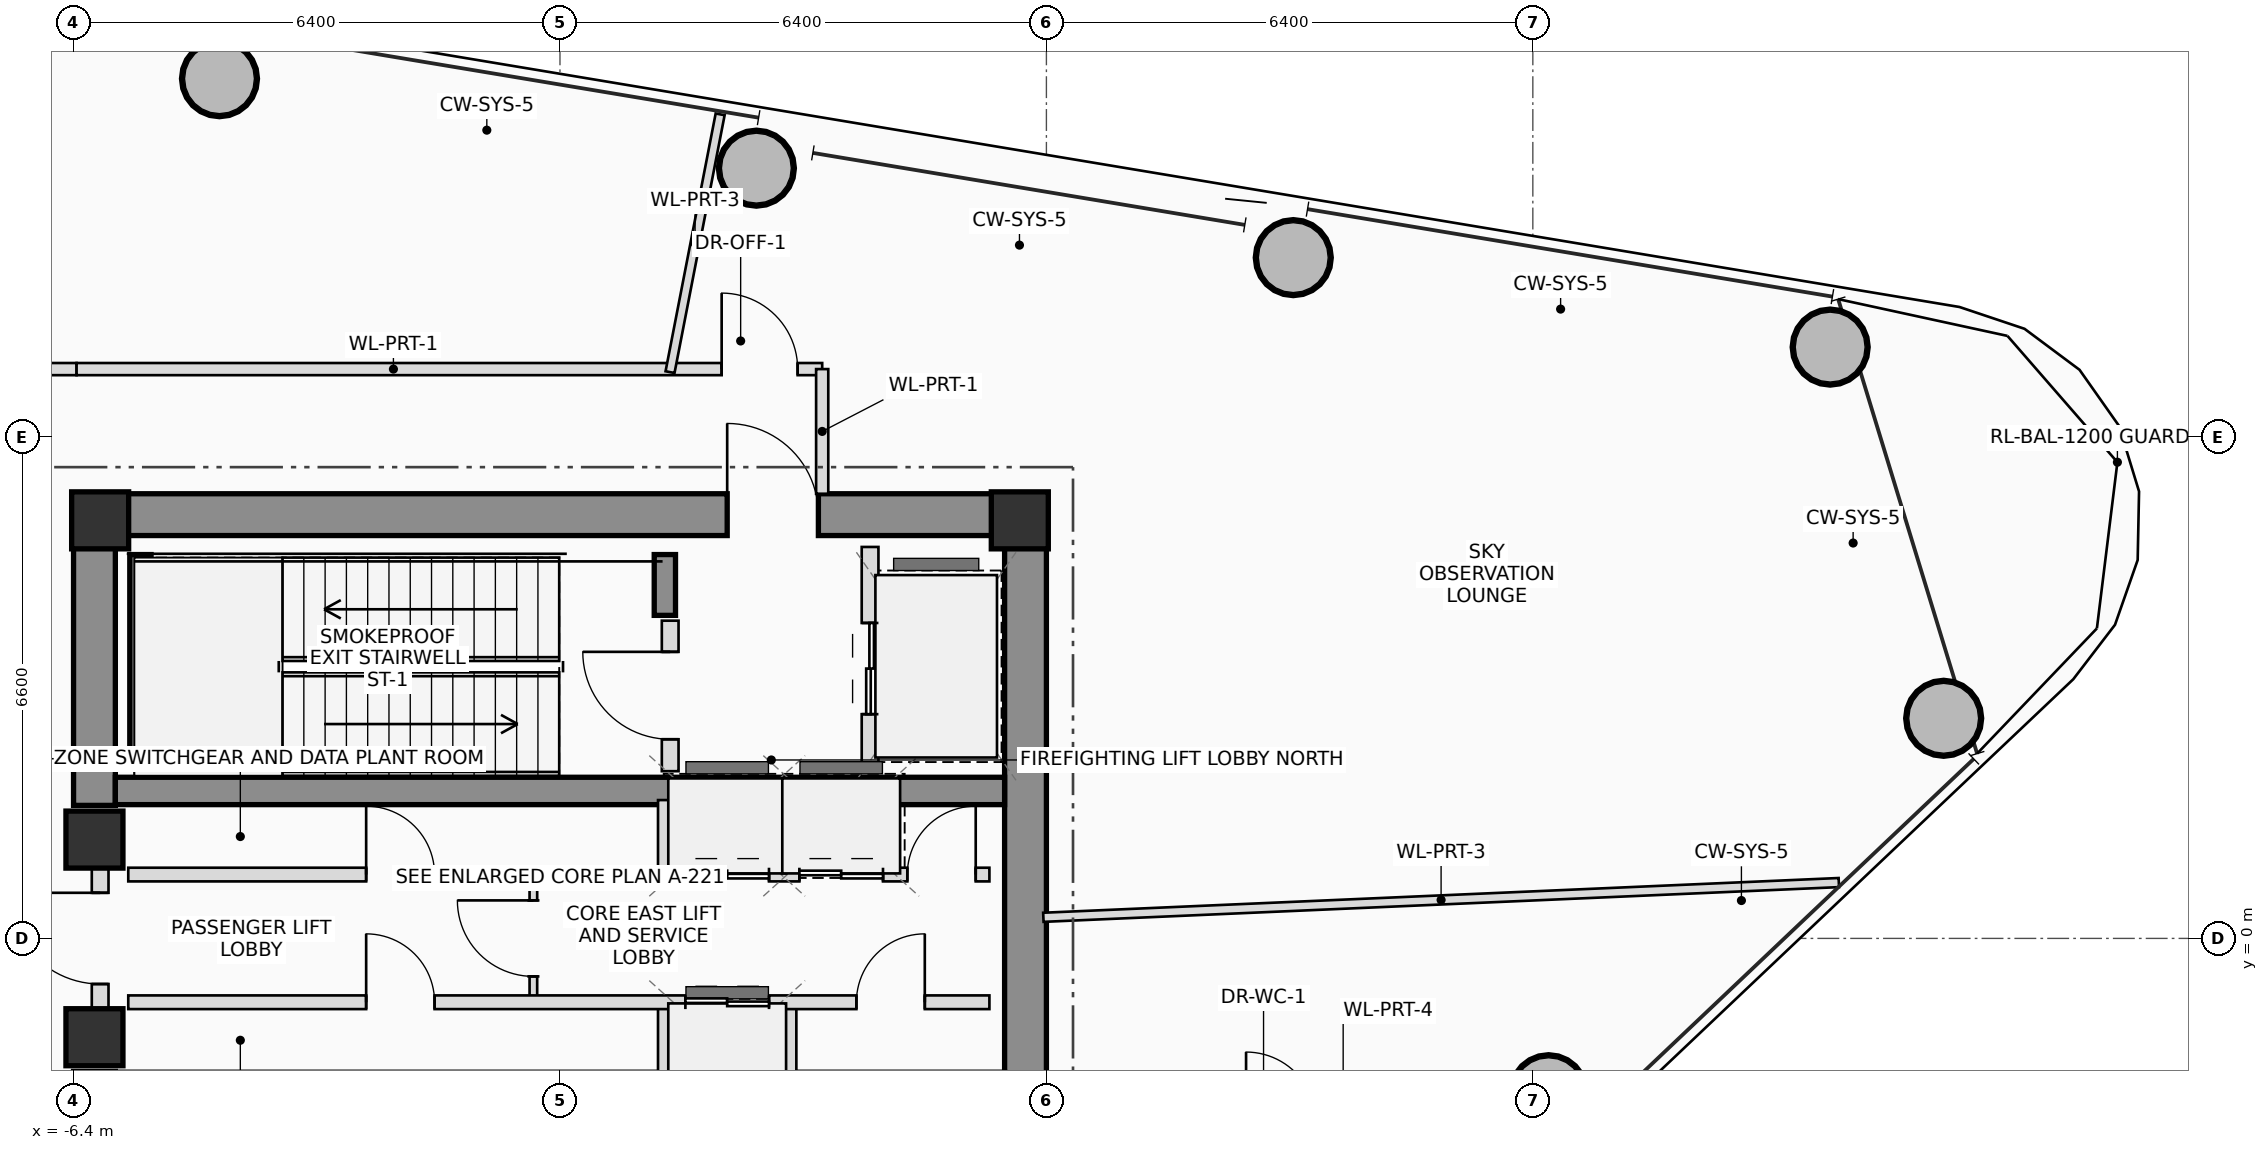
"""IFC4 building model, lengths in metres.
Left out: names, types, materials, properties, quantities, classifications, styles, units other than length and angle.
Written with IfcOpenShell. Run it as: python <this file> out.ifc"""

import sys

from ifc_helpers import new_model, si_unit, direction, frame, frame_2d, origin, origin_2d, place, context, subcontext, project, spatial, rectangle, hollow_circle, extrude, source, transform, mapped, element, fill, save


model = new_model("IFC4")
c1 = context("Model", 3, precision=1e-05, world=origin(), true_north=direction((0.0, 1.0)))
c2 = subcontext(c1, "Body", "Model", "MODEL_VIEW")
j1 = project(units=[si_unit("LENGTHUNIT", "METRE"), si_unit("PLANEANGLEUNIT", "RADIAN")], contexts=[c1])
p1 = place(None, origin())
s1 = spatial("IfcSite", under=j1, at=p1, CompositionType="ELEMENT")
p2 = place(p1, origin())
s2 = spatial("IfcBuilding", under=s1, at=p2, CompositionType="ELEMENT")
p3 = place(p2, frame((0.0, 0.0, 224.15)))
s3 = spatial("IfcBuildingStorey", under=s2, at=p3, CompositionType="ELEMENT", Elevation=224.15)
m1 = source(origin(), c2, "Body", "SweptSolid", [
    extrude(rectangle(XDim=0.75, YDim=0.75, at=origin_2d()), origin(), (0.0, 0.0, 1.0), 4.5),
])
for number, where, z_axis, x_axis in (
    (1, (6.05, 5.5, 0.0), (0.0, 0.0, 1.0), (1.0, 0.0, 0.0)),
    (2, (-6.05, 5.5, 0.0), (0.0, 0.0, 1.0), (1.0, 0.0, 0.0)),
):
    element("IfcColumn", number, at=place(p3, frame(where, z_axis=z_axis, x_axis=x_axis)), inside=s3, PredefinedType="COLUMN", context=c2, shape_type="MappedRepresentation", body=[
        mapped(m1, transform((0.0, 0.0, 0.0), scale=1.0)),
    ])
p4 = place(p3, frame((-6.4, 5.575, 0.0), z_axis=(0.0, 0.0, 1.0), x_axis=(1.0, 0.0, 0.0)))
e3 = element("IfcWall", 3, at=p4, inside=s3, PredefinedType="SHEAR", context=c2, shape_type="SweptSolid", body=[
    extrude(rectangle(XDim=12.8, YDim=0.55, at=frame_2d((6.4, 0.0))), origin(), (0.0, 0.0, 1.0), 4.5),
])
p5 = place(p4, frame((8.6, 0.0, 0.0)))
e4 = element("IfcOpeningElement", 4, at=p5, cuts=e3, PredefinedType="OPENING", context=c2, shape_type="SweptSolid", body=[
    extrude(rectangle(XDim=1.2, YDim=2.2, at=frame_2d((0.6, 1.1))), frame((0.0, 0.285, 0.0), z_axis=(0.0, -1.0, 0.0), x_axis=(1.0, 0.0, 0.0)), (0.0, 0.0, 1.0), 0.57),
])
p6 = place(p3, frame((6.125, -5.3, 0.0), z_axis=(0.0, 0.0, 1.0), x_axis=(0.0, 1.0, 0.0)))
e5 = element("IfcWall", 5, at=p6, inside=s3, PredefinedType="SHEAR", context=c2, shape_type="SweptSolid", body=[
    extrude(rectangle(XDim=10.6, YDim=0.55, at=frame_2d((5.3, 0.0))), origin(), (0.0, 0.0, 1.0), 4.5),
])
p7 = place(p3, frame((-6.125, 1.75, 0.0), z_axis=(0.0, 0.0, 1.0), x_axis=(0.0, 1.0, 0.0)))
e6 = element("IfcWall", 6, at=p7, inside=s3, PredefinedType="SHEAR", context=c2, shape_type="SweptSolid", body=[
    extrude(rectangle(XDim=3.55, YDim=0.55, at=frame_2d((1.775, 0.0))), origin(), (0.0, 0.0, 1.0), 4.5),
])
p8 = place(p3, frame((-5.85, 1.94, 0.0), z_axis=(0.0, 0.0, 1.0), x_axis=(1.0, 0.0, 0.0)))
e7 = element("IfcWall", 7, at=p8, inside=s3, PredefinedType="SHEAR", context=c2, shape_type="SweptSolid", body=[
    extrude(rectangle(XDim=11.7, YDim=0.36, at=frame_2d((5.85, 0.0))), origin(), (0.0, 0.0, 1.0), 4.5),
])
p9 = place(p3, frame((-5.52, 2.3, 0.0), z_axis=(0.0, 0.0, 1.0), x_axis=(0.0, 1.0, 0.0)))
e8 = element("IfcWall", 8, at=p9, inside=s3, PredefinedType="SHEAR", context=c2, shape_type="SweptSolid", body=[
    extrude(rectangle(XDim=2.75, YDim=0.28, at=frame_2d((1.375, 0.0))), origin(), (0.0, 0.0, 1.0), 4.5),
])
p10 = place(p3, frame((1.38, 4.25, 0.0), z_axis=(0.0, 0.0, 1.0), x_axis=(0.0, 1.0, 0.0)))
e9 = element("IfcWall", 9, at=p10, inside=s3, PredefinedType="SHEAR", context=c2, shape_type="SweptSolid", body=[
    extrude(rectangle(XDim=0.8, YDim=0.28, at=frame_2d((0.4, 0.0))), origin(), (0.0, 0.0, 1.0), 4.5),
])
for number, where, z_axis, x_axis in (
    (10, (-6.125, -1.3, 0.0), (0.0, 0.0, 1.0), (1.0, 0.0, 0.0)),
    (11, (-6.125, 1.3, 0.0), (0.0, 0.0, 1.0), (1.0, 0.0, 0.0)),
):
    element("IfcColumn", number, at=place(p3, frame(where, z_axis=z_axis, x_axis=x_axis)), inside=s3, PredefinedType="COLUMN", context=c2, shape_type="MappedRepresentation", body=[
        mapped(m1, transform((0.0, 0.0, 0.0), scale=1.0)),
    ])
m2 = source(origin(), c2, "Body", "SweptSolid", [
    extrude(hollow_circle(Radius=0.5, WallThickness=0.04, at=origin_2d()), origin(), (0.0, 0.0, 1.0), 4.5),
])
for number, where, z_axis, x_axis in (
    (12, (13.007, -2.03, 0.0), (0.0, 0.0, 1.0), (1.0, 0.0, 0.0)),
    (13, (18.205, 2.896, 0.0), (0.0, 0.0, 1.0), (1.0, 0.0, 0.0)),
    (14, (16.712, 7.779, 0.0), (0.0, 0.0, 1.0), (1.0, 0.0, 0.0)),
    (15, (9.648, 8.957, 0.0), (0.0, 0.0, 1.0), (1.0, 0.0, 0.0)),
    (16, (2.584, 10.134, 0.0), (0.0, 0.0, 1.0), (1.0, 0.0, 0.0)),
    (17, (-4.48, 11.311, 0.0), (0.0, 0.0, 1.0), (1.0, 0.0, 0.0)),
):
    element("IfcColumn", number, at=place(p3, frame(where, z_axis=z_axis, x_axis=x_axis)), inside=s3, PredefinedType="COLUMN", context=c2, shape_type="MappedRepresentation", body=[
        mapped(m2, transform((0.0, 0.0, 0.0), scale=1.0)),
    ])
p11 = place(p3, frame((-6.05, -0.95, 0.0), z_axis=(0.0, 0.0, 1.0), x_axis=(0.0, 1.0, 0.0)))
e18 = element("IfcWall", 18, at=p11, inside=s3, PredefinedType="PLUMBINGWALL", context=c2, shape_type="SweptSolid", body=[
    extrude(rectangle(XDim=1.9, YDim=0.22, at=frame_2d((0.95, 0.0))), origin(), (0.0, 0.0, 1.0), 3.28),
])
p12 = place(p11, frame((0.35, 0.0, 0.0)))
e19 = element("IfcOpeningElement", 19, at=p12, cuts=e18, PredefinedType="OPENING", context=c2, shape_type="SweptSolid", body=[
    extrude(rectangle(XDim=1.2, YDim=2.2, at=frame_2d((0.6, 1.1))), frame((0.0, 0.12, 0.0), z_axis=(0.0, -1.0, 0.0), x_axis=(1.0, 0.0, 0.0)), (0.0, 0.0, 1.0), 0.24),
])
p13 = place(p3, frame((1.45, 2.2, 0.0), z_axis=(0.0, 0.0, 1.0), x_axis=(0.0, 1.0, 0.0)))
e20 = element("IfcWall", 20, at=p13, inside=s3, PredefinedType="PLUMBINGWALL", context=c2, shape_type="SweptSolid", body=[
    extrude(rectangle(XDim=1.98, YDim=0.22, at=frame_2d((0.99, 0.0))), origin(), (0.0, 0.0, 1.0), 4.3),
])
p14 = place(p13, frame((0.42, 0.0, 0.0)))
e21 = element("IfcOpeningElement", 21, at=p14, cuts=e20, PredefinedType="OPENING", context=c2, shape_type="SweptSolid", body=[
    extrude(rectangle(XDim=1.15, YDim=2.15, at=frame_2d((0.575, 1.075))), frame((0.0, 0.12, 0.0), z_axis=(0.0, -1.0, 0.0), x_axis=(1.0, 0.0, 0.0)), (0.0, 0.0, 1.0), 0.24),
])
p15 = place(p3, frame((4.08, 2.2, 0.0), z_axis=(0.0, 0.0, 1.0), x_axis=(0.0, 1.0, 0.0)))
e22 = element("IfcWall", 22, at=p15, inside=s3, PredefinedType="PLUMBINGWALL", context=c2, shape_type="SweptSolid", body=[
    extrude(rectangle(XDim=2.95, YDim=0.22, at=frame_2d((1.475, 0.0))), origin(), (0.0, 0.0, 1.0), 4.3),
])
p16 = place(p15, frame((0.75, 0.0, 0.0)))
e23 = element("IfcOpeningElement", 23, at=p16, cuts=e22, PredefinedType="OPENING", context=c2, shape_type="SweptSolid", body=[
    extrude(rectangle(XDim=1.2, YDim=2.25, at=frame_2d((0.6, 1.125))), frame((0.0, 0.12, 0.0), z_axis=(0.0, -1.0, 0.0), x_axis=(1.0, 0.0, 0.0)), (0.0, 0.0, 1.0), 0.24),
])
p17 = place(p3, frame((-0.35, -0.84, 0.0), z_axis=(0.0, 0.0, 1.0), x_axis=(0.0, 1.0, 0.0)))
e24 = element("IfcWall", 24, at=p17, inside=s3, PredefinedType="PARTITIONING", context=c2, shape_type="SweptSolid", body=[
    extrude(rectangle(XDim=1.68, YDim=0.1, at=frame_2d((0.84, 0.0))), origin(), (0.0, 0.0, 1.0), 4.3),
])
p18 = place(p17, frame((0.34, 0.0, 0.0)))
e25 = element("IfcOpeningElement", 25, at=p18, cuts=e24, PredefinedType="OPENING", context=c2, shape_type="SweptSolid", body=[
    extrude(rectangle(XDim=1.0, YDim=2.25, at=frame_2d((0.5, 1.125))), frame((0.0, 0.06, 0.0), z_axis=(0.0, -1.0, 0.0), x_axis=(1.0, 0.0, 0.0)), (0.0, 0.0, 1.0), 0.12),
])
for number, where, z_axis, x_axis in (
    (26, (1.38, 0.84, 0.0), (0.0, 0.0, 1.0), (0.0, 1.0, 0.0)),
    (27, (1.38, -1.82, 0.0), (0.0, 0.0, 1.0), (0.0, 1.0, 0.0)),
    (28, (3.02, 0.84, 0.0), (0.0, 0.0, 1.0), (0.0, 1.0, 0.0)),
    (29, (4.38, 0.84, 0.0), (0.0, 0.0, 1.0), (0.0, 1.0, 0.0)),
    (30, (3.02, -1.82, 0.0), (0.0, 0.0, 1.0), (0.0, 1.0, 0.0)),
):
    element("IfcWall", number, at=place(p3, frame(where, z_axis=z_axis, x_axis=x_axis)), inside=s3, PredefinedType="PLUMBINGWALL", context=c2, shape_type="SweptSolid", body=[
        extrude(rectangle(XDim=0.98, YDim=0.18, at=frame_2d((0.49, 0.0))), origin(), (0.0, 0.0, 1.0), 4.3),
    ])
p19 = place(p3, frame((-5.68, 0.84, 0.0), z_axis=(0.0, 0.0, 1.0), x_axis=(1.0, 0.0, 0.0)))
e31 = element("IfcWall", 31, at=p19, inside=s3, PredefinedType="PLUMBINGWALL", context=c2, shape_type="SweptSolid", body=[
    extrude(rectangle(XDim=11.33, YDim=0.18, at=frame_2d((5.665, 0.0))), origin(), (0.0, 0.0, 1.0), 4.3),
])
p20 = place(p19, frame((3.13, 0.0, 0.0)))
e32 = element("IfcOpeningElement", 32, at=p20, cuts=e31, PredefinedType="OPENING", context=c2, shape_type="SweptSolid", body=[
    extrude(rectangle(XDim=0.9, YDim=2.05, at=frame_2d((0.45, 1.025))), frame((0.0, 0.1, 0.0), z_axis=(0.0, -1.0, 0.0), x_axis=(1.0, 0.0, 0.0)), (0.0, 0.0, 1.0), 0.2),
])
p21 = place(p19, frame((7.33, 0.0, 0.0)))
e33 = element("IfcOpeningElement", 33, at=p21, cuts=e31, PredefinedType="OPENING", context=c2, shape_type="SweptSolid", body=[
    extrude(rectangle(XDim=1.1, YDim=2.2, at=frame_2d((0.55, 1.1))), frame((0.0, 0.1, 0.0), z_axis=(0.0, -1.0, 0.0), x_axis=(1.0, 0.0, 0.0)), (0.0, 0.0, 1.0), 0.2),
])
p22 = place(p19, frame((8.83, 0.0, 0.0)))
e34 = element("IfcOpeningElement", 34, at=p22, cuts=e31, PredefinedType="OPENING", context=c2, shape_type="SweptSolid", body=[
    extrude(rectangle(XDim=1.1, YDim=2.2, at=frame_2d((0.55, 1.1))), frame((0.0, 0.1, 0.0), z_axis=(0.0, -1.0, 0.0), x_axis=(1.0, 0.0, 0.0)), (0.0, 0.0, 1.0), 0.2),
])
p23 = place(p19, frame((10.25, 0.0, 0.0)))
e35 = element("IfcOpeningElement", 35, at=p23, cuts=e31, PredefinedType="OPENING", context=c2, shape_type="SweptSolid", body=[
    extrude(rectangle(XDim=0.9, YDim=2.05, at=frame_2d((0.45, 1.025))), frame((0.0, 0.1, 0.0), z_axis=(0.0, -1.0, 0.0), x_axis=(1.0, 0.0, 0.0)), (0.0, 0.0, 1.0), 0.2),
])
p24 = place(p3, frame((-5.68, -0.84, 0.0), z_axis=(0.0, 0.0, 1.0), x_axis=(1.0, 0.0, 0.0)))
e36 = element("IfcWall", 36, at=p24, inside=s3, PredefinedType="PLUMBINGWALL", context=c2, shape_type="SweptSolid", body=[
    extrude(rectangle(XDim=11.33, YDim=0.18, at=frame_2d((5.665, 0.0))), origin(), (0.0, 0.0, 1.0), 4.3),
])
p25 = place(p24, frame((3.13, 0.0, 0.0)))
e37 = element("IfcOpeningElement", 37, at=p25, cuts=e36, PredefinedType="OPENING", context=c2, shape_type="SweptSolid", body=[
    extrude(rectangle(XDim=0.9, YDim=2.05, at=frame_2d((0.45, 1.025))), frame((0.0, 0.1, 0.0), z_axis=(0.0, -1.0, 0.0), x_axis=(1.0, 0.0, 0.0)), (0.0, 0.0, 1.0), 0.2),
])
p26 = place(p24, frame((7.33, 0.0, 0.0)))
e38 = element("IfcOpeningElement", 38, at=p26, cuts=e36, PredefinedType="OPENING", context=c2, shape_type="SweptSolid", body=[
    extrude(rectangle(XDim=1.1, YDim=2.2, at=frame_2d((0.55, 1.1))), frame((0.0, 0.1, 0.0), z_axis=(0.0, -1.0, 0.0), x_axis=(1.0, 0.0, 0.0)), (0.0, 0.0, 1.0), 0.2),
])
p27 = place(p24, frame((9.58, 0.0, 0.0)))
e39 = element("IfcOpeningElement", 39, at=p27, cuts=e36, PredefinedType="OPENING", context=c2, shape_type="SweptSolid", body=[
    extrude(rectangle(XDim=0.9, YDim=2.05, at=frame_2d((0.45, 1.025))), frame((0.0, 0.1, 0.0), z_axis=(0.0, -1.0, 0.0), x_axis=(1.0, 0.0, 0.0)), (0.0, 0.0, 1.0), 0.2),
])
p28 = place(p3, frame((-8.04, 7.49, 0.0), z_axis=(0.0, 0.0, 1.0), x_axis=(1.0, 0.0, 0.0)))
e40 = element("IfcWall", 40, at=p28, inside=s3, PredefinedType="PARTITIONING", context=c2, shape_type="SweptSolid", body=[
    extrude(rectangle(XDim=1.68, YDim=0.16, at=frame_2d((0.84, 0.0))), origin(), (0.0, 0.0, 1.0), 3.705),
])
p29 = place(p3, frame((-6.36, 7.49, 0.0), z_axis=(0.0, 0.0, 1.0), x_axis=(1.0, 0.0, 0.0)))
e41 = element("IfcWall", 41, at=p29, inside=s3, PredefinedType="PARTITIONING", context=c2, shape_type="SweptSolid", body=[
    extrude(rectangle(XDim=9.81, YDim=0.16, at=frame_2d((4.905, 0.0))), origin(), (0.0, 0.0, 1.0), 3.705),
])
p30 = place(p29, frame((8.487, 0.0, 0.0)))
e42 = element("IfcOpeningElement", 42, at=p30, cuts=e41, PredefinedType="OPENING", context=c2, shape_type="SweptSolid", body=[
    extrude(rectangle(XDim=1.0, YDim=2.25, at=frame_2d((0.5, 1.125))), frame((0.0, 0.09, 0.0), z_axis=(0.0, -1.0, 0.0), x_axis=(1.0, 0.0, 0.0)), (0.0, 0.0, 1.0), 0.18),
])
p31 = place(p3, frame((3.45, 7.49, 0.0), z_axis=(0.0, 0.0, 1.0), x_axis=(0.0, -1.0, 0.0)))
e43 = element("IfcWall", 43, at=p31, inside=s3, PredefinedType="PARTITIONING", context=c2, shape_type="SweptSolid", body=[
    extrude(rectangle(XDim=1.64, YDim=0.16, at=frame_2d((0.82, 0.0))), origin(), (0.0, 0.0, 1.0), 4.3),
])
p32 = place(p3, frame((6.36, 0.278, 0.0), z_axis=(0.0, 0.0, 1.0), x_axis=(0.999047873507, 0.043627358851, 0.0)))
e44 = element("IfcWall", 44, at=p32, inside=s3, PredefinedType="PARTITIONING", context=c2, shape_type="SweptSolid", body=[
    extrude(rectangle(XDim=10.476, YDim=0.12, at=frame_2d((5.238, 0.0))), origin(), (0.0, 0.0, 1.0), 3.705),
])
p33 = place(p3, frame((1.448, 7.45, 0.0), z_axis=(0.0, 0.0, 1.0), x_axis=(0.19085452876, 0.981618331558, 0.0)))
e45 = element("IfcWall", 45, at=p33, inside=s3, PredefinedType="PARTITIONING", context=c2, shape_type="SweptSolid", body=[
    extrude(rectangle(XDim=3.455, YDim=0.12, at=frame_2d((1.728, 0.0))), origin(), (0.0, 0.0, 1.0), 3.865),
])
p34 = place(p5, origin())
e46 = element("IfcDoor", 46, at=p34, inside=s3, OperationType="SINGLE_SWING_LEFT", PredefinedType="DOOR", context=c2, shape_type="SweptSolid", body=[
    extrude(rectangle(XDim=1.2, YDim=2.2, at=frame_2d((0.6, 1.1))), frame((0.0, 0.025, 0.0), z_axis=(0.0, -1.0, 0.0), x_axis=(1.0, 0.0, 0.0)), (0.0, 0.0, 1.0), 0.05),
])
fill(e4, e46)
p35 = place(p12, origin())
e47 = element("IfcDoor", 47, at=p35, inside=s3, OperationType="SINGLE_SWING_RIGHT", PredefinedType="DOOR", context=c2, shape_type="SweptSolid", body=[
    extrude(rectangle(XDim=1.2, YDim=2.2, at=frame_2d((0.6, 1.1))), frame((0.0, 0.025, 0.0), z_axis=(0.0, -1.0, 0.0), x_axis=(1.0, 0.0, 0.0)), (0.0, 0.0, 1.0), 0.05),
])
fill(e19, e47)
p36 = place(p14, origin())
e48 = element("IfcDoor", 48, at=p36, inside=s3, OperationType="SINGLE_SWING_RIGHT", PredefinedType="DOOR", context=c2, shape_type="SweptSolid", body=[
    extrude(rectangle(XDim=1.15, YDim=2.15, at=frame_2d((0.575, 1.075))), frame((0.0, 0.025, 0.0), z_axis=(0.0, -1.0, 0.0), x_axis=(1.0, 0.0, 0.0)), (0.0, 0.0, 1.0), 0.05),
])
fill(e21, e48)
p37 = place(p16, origin())
e49 = element("IfcDoor", 49, at=p37, inside=s3, OperationType="DOUBLE_DOOR_SLIDING", PredefinedType="DOOR", context=c2, shape_type="SweptSolid", body=[
    extrude(rectangle(XDim=1.2, YDim=2.25, at=frame_2d((0.6, 1.125))), frame((0.0, 0.025, 0.0), z_axis=(0.0, -1.0, 0.0), x_axis=(1.0, 0.0, 0.0)), (0.0, 0.0, 1.0), 0.05),
])
fill(e23, e49)
p38 = place(p18, origin())
e50 = element("IfcDoor", 50, at=p38, inside=s3, OperationType="SINGLE_SWING_RIGHT", PredefinedType="DOOR", context=c2, shape_type="SweptSolid", body=[
    extrude(rectangle(XDim=1.0, YDim=2.25, at=frame_2d((0.5, 1.125))), frame((0.0, 0.025, 0.0), z_axis=(0.0, -1.0, 0.0), x_axis=(1.0, 0.0, 0.0)), (0.0, 0.0, 1.0), 0.05),
])
fill(e25, e50)
p39 = place(p20, origin())
e51 = element("IfcDoor", 51, at=p39, inside=s3, OperationType="SINGLE_SWING_LEFT", PredefinedType="DOOR", context=c2, shape_type="SweptSolid", body=[
    extrude(rectangle(XDim=0.9, YDim=2.05, at=frame_2d((0.45, 1.025))), frame((0.0, 0.025, 0.0), z_axis=(0.0, -1.0, 0.0), x_axis=(1.0, 0.0, 0.0)), (0.0, 0.0, 1.0), 0.05),
])
fill(e32, e51)
p40 = place(p21, origin())
e52 = element("IfcDoor", 52, at=p40, inside=s3, OperationType="DOUBLE_DOOR_SLIDING", PredefinedType="DOOR", context=c2, shape_type="SweptSolid", body=[
    extrude(rectangle(XDim=1.1, YDim=2.2, at=frame_2d((0.55, 1.1))), frame((0.0, 0.025, 0.0), z_axis=(0.0, -1.0, 0.0), x_axis=(1.0, 0.0, 0.0)), (0.0, 0.0, 1.0), 0.05),
])
fill(e33, e52)
p41 = place(p22, origin())
e53 = element("IfcDoor", 53, at=p41, inside=s3, OperationType="DOUBLE_DOOR_SLIDING", PredefinedType="DOOR", context=c2, shape_type="SweptSolid", body=[
    extrude(rectangle(XDim=1.1, YDim=2.2, at=frame_2d((0.55, 1.1))), frame((0.0, 0.025, 0.0), z_axis=(0.0, -1.0, 0.0), x_axis=(1.0, 0.0, 0.0)), (0.0, 0.0, 1.0), 0.05),
])
fill(e34, e53)
p42 = place(p23, origin())
e54 = element("IfcDoor", 54, at=p42, inside=s3, OperationType="SINGLE_SWING_RIGHT", PredefinedType="DOOR", context=c2, shape_type="SweptSolid", body=[
    extrude(rectangle(XDim=0.9, YDim=2.05, at=frame_2d((0.45, 1.025))), frame((0.0, 0.025, 0.0), z_axis=(0.0, -1.0, 0.0), x_axis=(1.0, 0.0, 0.0)), (0.0, 0.0, 1.0), 0.05),
])
fill(e35, e54)
p43 = place(p25, origin())
e55 = element("IfcDoor", 55, at=p43, inside=s3, OperationType="SINGLE_SWING_LEFT", PredefinedType="DOOR", context=c2, shape_type="SweptSolid", body=[
    extrude(rectangle(XDim=0.9, YDim=2.05, at=frame_2d((0.45, 1.025))), frame((0.0, 0.025, 0.0), z_axis=(0.0, -1.0, 0.0), x_axis=(1.0, 0.0, 0.0)), (0.0, 0.0, 1.0), 0.05),
])
fill(e37, e55)
p44 = place(p26, origin())
e56 = element("IfcDoor", 56, at=p44, inside=s3, OperationType="DOUBLE_DOOR_SLIDING", PredefinedType="DOOR", context=c2, shape_type="SweptSolid", body=[
    extrude(rectangle(XDim=1.1, YDim=2.2, at=frame_2d((0.55, 1.1))), frame((0.0, 0.025, 0.0), z_axis=(0.0, -1.0, 0.0), x_axis=(1.0, 0.0, 0.0)), (0.0, 0.0, 1.0), 0.05),
])
fill(e38, e56)
p45 = place(p27, origin())
e57 = element("IfcDoor", 57, at=p45, inside=s3, OperationType="SINGLE_SWING_RIGHT", PredefinedType="DOOR", context=c2, shape_type="SweptSolid", body=[
    extrude(rectangle(XDim=0.9, YDim=2.05, at=frame_2d((0.45, 1.025))), frame((0.0, 0.025, 0.0), z_axis=(0.0, -1.0, 0.0), x_axis=(1.0, 0.0, 0.0)), (0.0, 0.0, 1.0), 0.05),
])
fill(e39, e57)
p46 = place(p30, origin())
e58 = element("IfcDoor", 58, at=p46, inside=s3, OperationType="SINGLE_SWING_LEFT", PredefinedType="DOOR", context=c2, shape_type="SweptSolid", body=[
    extrude(rectangle(XDim=1.0, YDim=2.25, at=frame_2d((0.5, 1.125))), frame((0.0, 0.025, 0.0), z_axis=(0.0, -1.0, 0.0), x_axis=(1.0, 0.0, 0.0)), (0.0, 0.0, 1.0), 0.05),
])
fill(e42, e58)
save(model, sys.argv[1])
